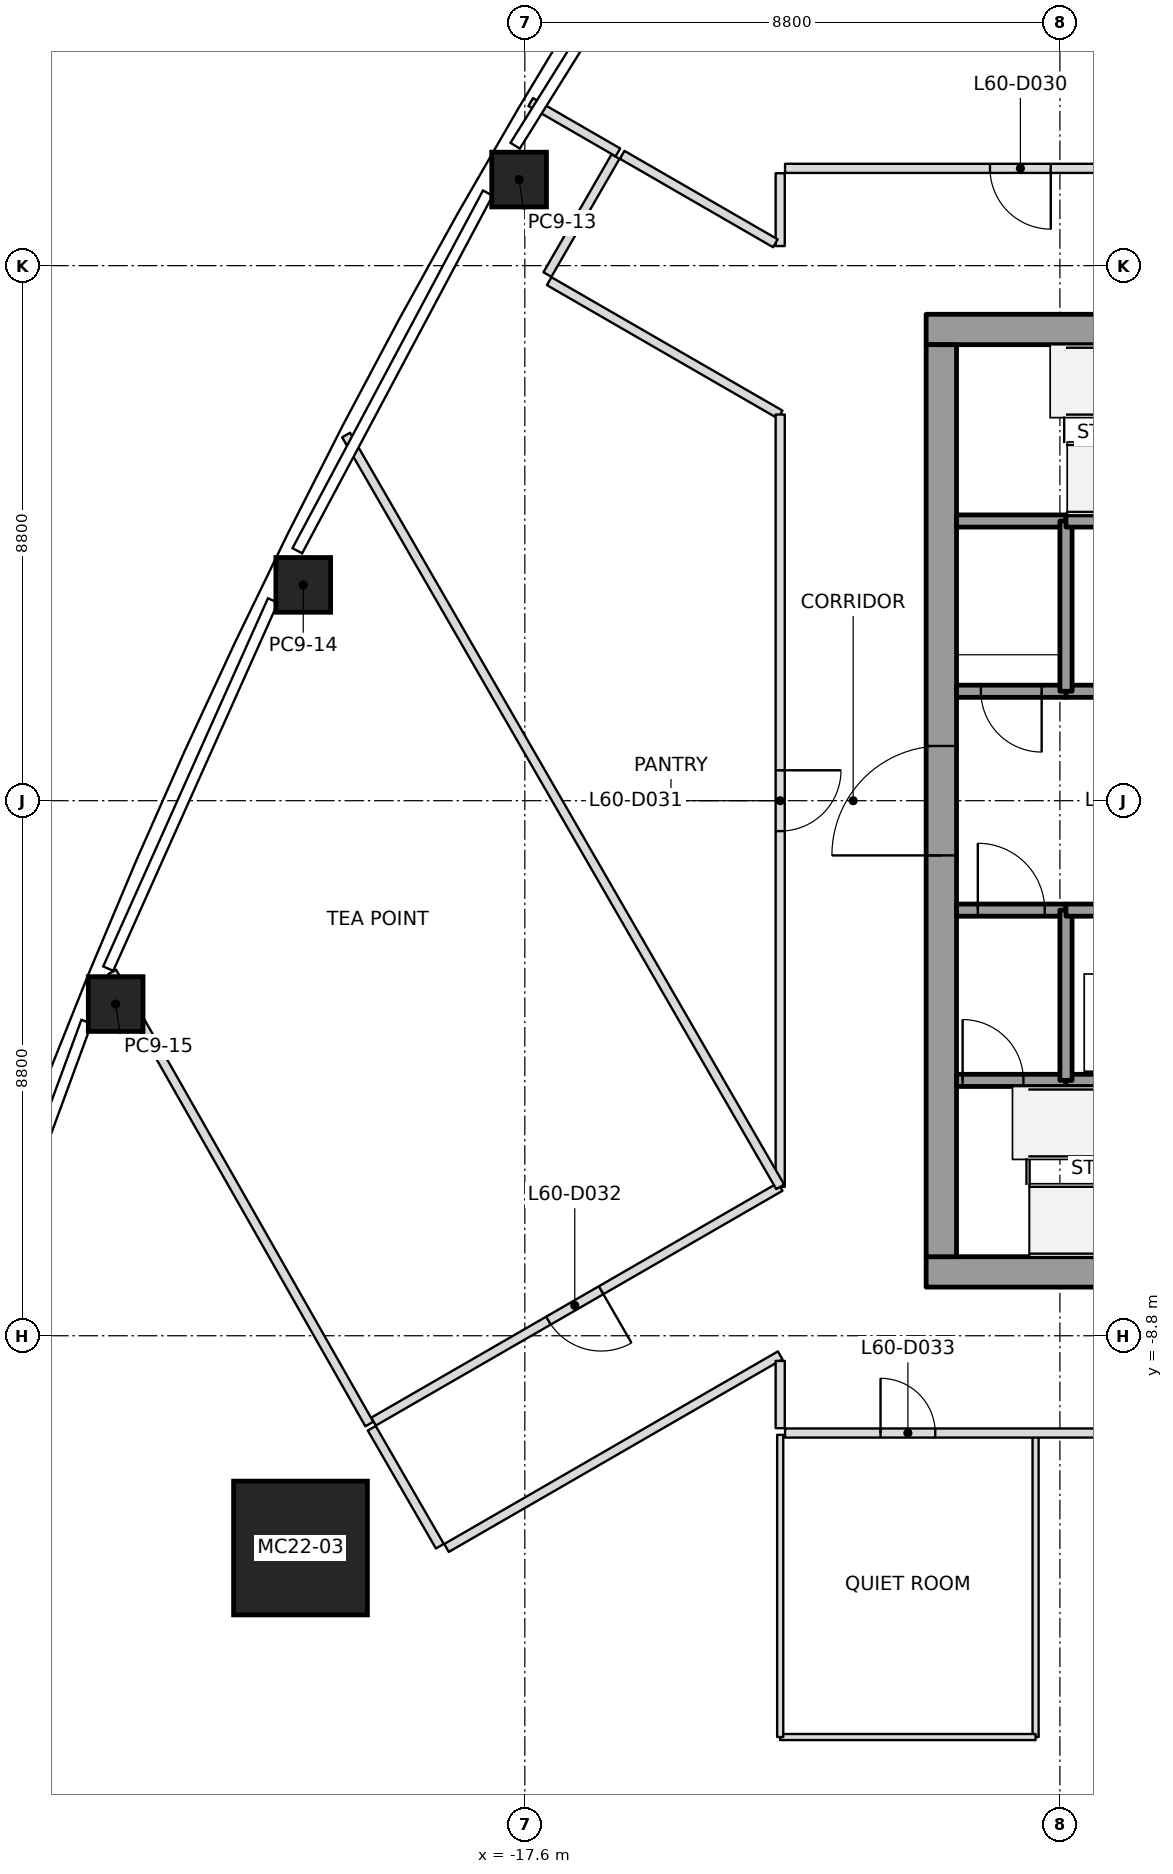
"""IFC4 building model, lengths in metres.
Left out: names, types, materials, properties, quantities, classifications, styles, units other than length and angle.
Written with IfcOpenShell. Run it as: python <this file> out.ifc"""

import sys

from ifc_helpers import new_model, si_unit, direction, frame, frame_2d, origin, origin_2d, place, context, subcontext, project, spatial, rectangle, extrude, element, fill, save


model = new_model("IFC4")
c1 = context("Model", 3, precision=1e-05, world=origin(), true_north=direction((0.0, 1.0)))
c2 = subcontext(c1, "Body", "Model", "MODEL_VIEW")
j1 = project(units=[si_unit("LENGTHUNIT", "METRE"), si_unit("PLANEANGLEUNIT", "RADIAN")], contexts=[c1])
p1 = place(None, origin())
s1 = spatial("IfcSite", under=j1, at=p1, CompositionType="ELEMENT")
p2 = place(p1, origin())
s2 = spatial("IfcBuilding", under=s1, at=p2, CompositionType="ELEMENT")
p3 = place(p2, frame((0.0, 0.0, 267.0)))
s3 = spatial("IfcBuildingStorey", under=s2, at=p3, CompositionType="ELEMENT", Elevation=267.0)
p4 = place(p3, frame((-21.289, -12.291, 0.0), z_axis=(0.027817676907, 0.016043967164, 0.999484250986), x_axis=(0.999613013546, -0.000446478676, -0.027814093645)))
e1 = element("IfcColumn", 1, at=p4, inside=s3, PredefinedType="COLUMN", context=c2, shape_type="SweptSolid", body=[
    extrude(rectangle(XDim=2.2, YDim=2.2, at=origin_2d()), origin(), (0.0, 0.0, 1.0), 4.002),
])
p5 = place(p3, frame((-17.694, 10.216, 0.0), z_axis=(0.009887049298, -0.00573692984, 0.999934664812), x_axis=(0.499975560967, 0.866039512843, 2.5126546e-05)))
e2 = element("IfcColumn", 2, at=p5, inside=s3, PredefinedType="COLUMN", context=c2, shape_type="SweptSolid", body=[
    extrude(rectangle(XDim=0.9, YDim=0.9, at=origin_2d()), origin(), (0.0, 0.0, 1.0), 4.0),
])
p6 = place(p3, frame((-21.244, 3.549, 0.0), z_axis=(0.014097691364, 0.002013955909, 0.999898594398), x_axis=(0.439450311586, 0.8982312302, -0.008005044713)))
e3 = element("IfcColumn", 3, at=p6, inside=s3, PredefinedType="COLUMN", context=c2, shape_type="SweptSolid", body=[
    extrude(rectangle(XDim=0.9, YDim=0.9, at=origin_2d()), origin(), (0.0, 0.0, 1.0), 4.0),
])
p7 = place(p3, frame((-24.329, -3.344, 0.0), z_axis=(0.017757551143, 0.009946669541, 0.999792845115), x_axis=(0.376861693588, 0.926132938269, -0.015907374376)))
e4 = element("IfcColumn", 4, at=p7, inside=s3, PredefinedType="COLUMN", context=c2, shape_type="SweptSolid", body=[
    extrude(rectangle(XDim=0.9, YDim=0.9, at=origin_2d()), origin(), (0.0, 0.0, 1.0), 4.001),
])
p8 = place(p3, frame((-11.0, -7.75, 0.0), z_axis=(0.0, 0.0, 1.0), x_axis=(1.0, 0.0, 0.0)))
e5 = element("IfcWall", 5, at=p8, inside=s3, PredefinedType="SHEAR", context=c2, shape_type="SweptSolid", body=[
    extrude(rectangle(XDim=22.0, YDim=0.5, at=frame_2d((11.0, 0.0))), origin(), (0.0, 0.0, 1.0), 4.0),
])
p9 = place(p8, frame((10.45, 0.0, 0.0)))
e6 = element("IfcOpeningElement", 6, at=p9, cuts=e5, PredefinedType="OPENING", context=c2, shape_type="SweptSolid", body=[
    extrude(rectangle(XDim=1.1, YDim=2.1, at=frame_2d((0.55, 1.05))), frame((0.0, 0.25, 0.0), z_axis=(0.0, -1.0, 0.0), x_axis=(1.0, 0.0, 0.0)), (0.0, 0.0, 1.0), 0.5),
])
p10 = place(p3, frame((-11.0, 7.75, 0.0), z_axis=(0.0, 0.0, 1.0), x_axis=(1.0, 0.0, 0.0)))
e7 = element("IfcWall", 7, at=p10, inside=s3, PredefinedType="SHEAR", context=c2, shape_type="SweptSolid", body=[
    extrude(rectangle(XDim=22.0, YDim=0.5, at=frame_2d((11.0, 0.0))), origin(), (0.0, 0.0, 1.0), 4.0),
])
p11 = place(p10, frame((10.45, 0.0, 0.0)))
e8 = element("IfcOpeningElement", 8, at=p11, cuts=e7, PredefinedType="OPENING", context=c2, shape_type="SweptSolid", body=[
    extrude(rectangle(XDim=1.1, YDim=2.1, at=frame_2d((0.55, 1.05))), frame((0.0, 0.25, 0.0), z_axis=(0.0, -1.0, 0.0), x_axis=(1.0, 0.0, 0.0)), (0.0, 0.0, 1.0), 0.5),
])
p12 = place(p3, frame((-10.75, -7.5, 0.0), z_axis=(0.0, 0.0, 1.0), x_axis=(0.0, 1.0, 0.0)))
e9 = element("IfcWall", 9, at=p12, inside=s3, PredefinedType="SHEAR", context=c2, shape_type="SweptSolid", body=[
    extrude(rectangle(XDim=15.0, YDim=0.5, at=frame_2d((7.5, 0.0))), origin(), (0.0, 0.0, 1.0), 4.0),
])
p13 = place(p12, frame((6.6, 0.0, 0.0)))
e10 = element("IfcOpeningElement", 10, at=p13, cuts=e9, PredefinedType="OPENING", context=c2, shape_type="SweptSolid", body=[
    extrude(rectangle(XDim=1.8, YDim=2.1, at=frame_2d((0.9, 1.05))), frame((0.0, 0.25, 0.0), z_axis=(0.0, -1.0, 0.0), x_axis=(1.0, 0.0, 0.0)), (0.0, 0.0, 1.0), 0.5),
])
p14 = place(p3, frame((-10.5, -4.6, 0.0), z_axis=(0.0, 0.0, 1.0), x_axis=(1.0, 0.0, 0.0)))
e11 = element("IfcWall", 11, at=p14, inside=s3, PredefinedType="SOLIDWALL", context=c2, shape_type="SweptSolid", body=[
    extrude(rectangle(XDim=1.8, YDim=0.2, at=frame_2d((0.9, 0.0))), origin(), (0.0, 0.0, 1.0), 3.85),
])
p15 = place(p14, frame((0.1, 0.0, 0.0)))
e12 = element("IfcOpeningElement", 12, at=p15, cuts=e11, PredefinedType="OPENING", context=c2, shape_type="SweptSolid", body=[
    extrude(rectangle(XDim=1.0, YDim=2.1, at=frame_2d((0.5, 1.05))), frame((0.0, 0.1, 0.0), z_axis=(0.0, -1.0, 0.0), x_axis=(1.0, 0.0, 0.0)), (0.0, 0.0, 1.0), 0.2),
])
p16 = place(p3, frame((-10.5, -1.8, 0.0), z_axis=(0.0, 0.0, 1.0), x_axis=(1.0, 0.0, 0.0)))
e13 = element("IfcWall", 13, at=p16, inside=s3, PredefinedType="SOLIDWALL", context=c2, shape_type="SweptSolid", body=[
    extrude(rectangle(XDim=1.8, YDim=0.2, at=frame_2d((0.9, 0.0))), origin(), (0.0, 0.0, 1.0), 3.85),
])
p17 = place(p16, frame((0.35, 0.0, 0.0)))
e14 = element("IfcOpeningElement", 14, at=p17, cuts=e13, PredefinedType="OPENING", context=c2, shape_type="SweptSolid", body=[
    extrude(rectangle(XDim=1.1, YDim=2.1, at=frame_2d((0.55, 1.05))), frame((0.0, 0.1, 0.0), z_axis=(0.0, -1.0, 0.0), x_axis=(1.0, 0.0, 0.0)), (0.0, 0.0, 1.0), 0.2),
])
p18 = place(p3, frame((-8.7, 1.8, 0.0), z_axis=(0.0, 0.0, 1.0), x_axis=(-1.0, 0.0, 0.0)))
e15 = element("IfcWall", 15, at=p18, inside=s3, PredefinedType="SOLIDWALL", context=c2, shape_type="SweptSolid", body=[
    extrude(rectangle(XDim=1.8, YDim=0.2, at=frame_2d((0.9, 0.0))), origin(), (0.0, 0.0, 1.0), 3.85),
])
p19 = place(p18, frame((0.4, 0.0, 0.0)))
e16 = element("IfcOpeningElement", 16, at=p19, cuts=e15, PredefinedType="OPENING", context=c2, shape_type="SweptSolid", body=[
    extrude(rectangle(XDim=1.0, YDim=2.1, at=frame_2d((0.5, 1.05))), frame((0.0, 0.1, 0.0), z_axis=(0.0, -1.0, 0.0), x_axis=(1.0, 0.0, 0.0)), (0.0, 0.0, 1.0), 0.2),
])
p20 = place(p3, frame((-8.7, 4.6, 0.0), z_axis=(0.0, 0.0, 1.0), x_axis=(-1.0, 0.0, 0.0)))
e17 = element("IfcWall", 17, at=p20, inside=s3, PredefinedType="SOLIDWALL", context=c2, shape_type="SweptSolid", body=[
    extrude(rectangle(XDim=1.8, YDim=0.2, at=frame_2d((0.9, 0.0))), origin(), (0.0, 0.0, 1.0), 3.85),
])
p21 = place(p3, frame((-8.7, -4.6, 0.0), z_axis=(0.0, 0.0, 1.0), x_axis=(1.0, 0.0, 0.0)))
e18 = element("IfcWall", 18, at=p21, inside=s3, PredefinedType="SOLIDWALL", context=c2, shape_type="SweptSolid", body=[
    extrude(rectangle(XDim=2.6, YDim=0.2, at=frame_2d((1.3, 0.0))), origin(), (0.0, 0.0, 1.0), 3.85),
])
p22 = place(p3, frame((-8.7, -4.6, 0.0), z_axis=(0.0, 0.0, 1.0), x_axis=(0.0, 1.0, 0.0)))
e19 = element("IfcWall", 19, at=p22, inside=s3, PredefinedType="SOLIDWALL", context=c2, shape_type="SweptSolid", body=[
    extrude(rectangle(XDim=2.8, YDim=0.2, at=frame_2d((1.4, 0.0))), origin(), (0.0, 0.0, 1.0), 3.85),
])
p23 = place(p3, frame((-8.7, -1.8, 0.0), z_axis=(0.0, 0.0, 1.0), x_axis=(1.0, 0.0, 0.0)))
e20 = element("IfcWall", 20, at=p23, inside=s3, PredefinedType="SOLIDWALL", context=c2, shape_type="SweptSolid", body=[
    extrude(rectangle(XDim=2.6, YDim=0.2, at=frame_2d((1.3, 0.0))), origin(), (0.0, 0.0, 1.0), 3.85),
])
p24 = place(p23, frame((0.75, 0.0, 0.0)))
e21 = element("IfcOpeningElement", 21, at=p24, cuts=e20, PredefinedType="OPENING", context=c2, shape_type="SweptSolid", body=[
    extrude(rectangle(XDim=1.1, YDim=2.1, at=frame_2d((0.55, 1.05))), frame((0.0, 0.1, 0.0), z_axis=(0.0, -1.0, 0.0), x_axis=(1.0, 0.0, 0.0)), (0.0, 0.0, 1.0), 0.2),
])
p25 = place(p3, frame((-8.7, 1.8, 0.0), z_axis=(0.0, 0.0, 1.0), x_axis=(1.0, 0.0, 0.0)))
e22 = element("IfcWall", 22, at=p25, inside=s3, PredefinedType="SOLIDWALL", context=c2, shape_type="SweptSolid", body=[
    extrude(rectangle(XDim=5.2, YDim=0.2, at=frame_2d((2.6, 0.0))), origin(), (0.0, 0.0, 1.0), 3.85),
])
p26 = place(p25, frame((2.15, 0.0, 0.0)))
e23 = element("IfcOpeningElement", 23, at=p26, cuts=e22, PredefinedType="OPENING", context=c2, shape_type="SweptSolid", body=[
    extrude(rectangle(XDim=0.9, YDim=2.1, at=frame_2d((0.45, 1.05))), frame((0.0, 0.1, 0.0), z_axis=(0.0, -1.0, 0.0), x_axis=(1.0, 0.0, 0.0)), (0.0, 0.0, 1.0), 0.2),
])
p27 = place(p3, frame((-8.7, 4.6, 0.0), z_axis=(0.0, 0.0, 1.0), x_axis=(0.0, -1.0, 0.0)))
e24 = element("IfcWall", 24, at=p27, inside=s3, PredefinedType="SOLIDWALL", context=c2, shape_type="SweptSolid", body=[
    extrude(rectangle(XDim=2.8, YDim=0.2, at=frame_2d((1.4, 0.0))), origin(), (0.0, 0.0, 1.0), 3.85),
])
p28 = place(p3, frame((-4.3, 4.6, 0.0), z_axis=(0.0, 0.0, 1.0), x_axis=(-1.0, 0.0, 0.0)))
e25 = element("IfcWall", 25, at=p28, inside=s3, PredefinedType="SOLIDWALL", context=c2, shape_type="SweptSolid", body=[
    extrude(rectangle(XDim=4.4, YDim=0.2, at=frame_2d((2.2, 0.0))), origin(), (0.0, 0.0, 1.0), 3.85),
])
p29 = place(p3, frame((-20.157, -10.252, 0.0), z_axis=(0.0, 0.0, 1.0), x_axis=(-0.494481502231, 0.869188152215, 0.0)))
e26 = element("IfcWall", 26, at=p29, inside=s3, PredefinedType="PARTITIONING", context=c2, shape_type="SweptSolid", body=[
    extrude(rectangle(XDim=8.555, YDim=0.15, at=frame_2d((4.277, 0.0))), origin(), (0.0, 0.0, 1.0), 3.443),
])
p30 = place(p3, frame((-13.4, -6.351, 0.0), z_axis=(0.0, 0.0, 1.0), x_axis=(-0.500017486311, 0.866015307823, 0.0)))
e27 = element("IfcWall", 27, at=p30, inside=s3, PredefinedType="PARTITIONING", context=c2, shape_type="SweptSolid", body=[
    extrude(rectangle(XDim=14.278, YDim=0.15, at=frame_2d((7.139, 0.0))), origin(), (0.0, 0.0, 1.0), 3.234),
])
p31 = place(p3, frame((-16.068, 10.663, 0.0), z_axis=(0.0, 0.0, 1.0), x_axis=(-0.866021116422, 0.500007425856, 0.0)))
e28 = element("IfcWall", 28, at=p31, inside=s3, PredefinedType="PARTITIONING", context=c2, shape_type="SweptSolid", body=[
    extrude(rectangle(XDim=1.656, YDim=0.15, at=frame_2d((0.828, 0.0))), origin(), (0.0, 0.0, 1.0), 3.234),
])
p32 = place(p3, frame((-20.117, -10.321, 0.0), z_axis=(0.0, 0.0, 1.0), x_axis=(0.500030632641, -0.866007717299, 0.0)))
e29 = element("IfcWall", 29, at=p32, inside=s3, PredefinedType="PARTITIONING", context=c2, shape_type="SweptSolid", body=[
    extrude(rectangle(XDim=2.24, YDim=0.15, at=frame_2d((1.12, 0.0))), origin(), (0.0, 0.0, 1.0), 3.233),
])
p33 = place(p3, frame((-13.4, -6.351, 0.0), z_axis=(0.0, 0.0, 1.0), x_axis=(-0.866024490366, -0.500001582084, 0.0)))
e30 = element("IfcWall", 30, at=p33, inside=s3, PredefinedType="PARTITIONING", context=c2, shape_type="SweptSolid", body=[
    extrude(rectangle(XDim=7.723, YDim=0.15, at=frame_2d((3.861, 0.0))), origin(), (0.0, 0.0, 1.0), 3.317),
])
p34 = place(p33, frame((3.401, 0.0, 0.0)))
e31 = element("IfcOpeningElement", 31, at=p34, cuts=e30, PredefinedType="OPENING", context=c2, shape_type="SweptSolid", body=[
    extrude(rectangle(XDim=1.0, YDim=2.1, at=frame_2d((0.5, 1.05))), frame((0.0, 0.075, 0.0), z_axis=(0.0, -1.0, 0.0), x_axis=(1.0, 0.0, 0.0)), (0.0, 0.0, 1.0), 0.15),
])
p35 = place(p3, frame((-18.888, -12.291, 0.0), z_axis=(0.0, 0.0, 1.0), x_axis=(0.866020054385, 0.500009265317, 0.0)))
e32 = element("IfcWall", 32, at=p35, inside=s3, PredefinedType="PARTITIONING", context=c2, shape_type="SweptSolid", body=[
    extrude(rectangle(XDim=6.337, YDim=0.15, at=frame_2d((3.168, 0.0))), origin(), (0.0, 0.0, 1.0), 3.233),
])
p36 = place(p3, frame((-13.4, -9.214, 0.0), z_axis=(0.0, 0.0, 1.0), x_axis=(0.0, -1.0, 0.0)))
e33 = element("IfcWall", 33, at=p36, inside=s3, PredefinedType="PARTITIONING", context=c2, shape_type="SweptSolid", body=[
    extrude(rectangle(XDim=1.106, YDim=0.15, at=frame_2d((0.553, 0.0))), origin(), (0.0, 0.0, 1.0), 3.233),
])
p37 = place(p3, frame((-16.108, 10.594, 0.0), z_axis=(0.0, 0.0, 1.0), x_axis=(-0.500030632641, -0.866007717299, 0.0)))
e34 = element("IfcWall", 34, at=p37, inside=s3, PredefinedType="PARTITIONING", context=c2, shape_type="SweptSolid", body=[
    extrude(rectangle(XDim=2.24, YDim=0.15, at=frame_2d((1.12, 0.0))), origin(), (0.0, 0.0, 1.0), 3.45),
])
p38 = place(p3, frame((-17.199, 8.544, 0.0), z_axis=(0.0, 0.0, 1.0), x_axis=(0.866042871377, -0.499969744021, 0.0)))
e35 = element("IfcWall", 35, at=p38, inside=s3, PredefinedType="PARTITIONING", context=c2, shape_type="SweptSolid", body=[
    extrude(rectangle(XDim=4.387, YDim=0.15, at=frame_2d((2.193, 0.0))), origin(), (0.0, 0.0, 1.0), 3.45),
])
p39 = place(p3, frame((-13.4, 6.351, 0.0), z_axis=(0.0, 0.0, 1.0), x_axis=(0.0, -1.0, 0.0)))
e36 = element("IfcWall", 36, at=p39, inside=s3, PredefinedType="PARTITIONING", context=c2, shape_type="SweptSolid", body=[
    extrude(rectangle(XDim=12.702, YDim=0.15, at=frame_2d((6.351, 0.0))), origin(), (0.0, 0.0, 1.0), 3.317),
])
p40 = place(p39, frame((5.851, 0.0, 0.0)))
e37 = element("IfcOpeningElement", 37, at=p40, cuts=e36, PredefinedType="OPENING", context=c2, shape_type="SweptSolid", body=[
    extrude(rectangle(XDim=1.0, YDim=2.1, at=frame_2d((0.5, 1.05))), frame((0.0, 0.075, 0.0), z_axis=(0.0, -1.0, 0.0), x_axis=(1.0, 0.0, 0.0)), (0.0, 0.0, 1.0), 0.15),
])
p41 = place(p3, frame((-13.4, 10.32, 0.0), z_axis=(0.0, 0.0, 1.0), x_axis=(0.0, -1.0, 0.0)))
e38 = element("IfcWall", 38, at=p41, inside=s3, PredefinedType="PARTITIONING", context=c2, shape_type="SweptSolid", body=[
    extrude(rectangle(XDim=1.198, YDim=0.15, at=frame_2d((0.599, 0.0))), origin(), (0.0, 0.0, 1.0), 3.45),
])
p42 = place(p3, frame((-13.479, 9.168, 0.0), z_axis=(0.0, 0.0, 1.0), x_axis=(-0.866019304365, 0.500010564355, 0.0)))
e39 = element("IfcWall", 39, at=p42, inside=s3, PredefinedType="PARTITIONING", context=c2, shape_type="SweptSolid", body=[
    extrude(rectangle(XDim=2.91, YDim=0.15, at=frame_2d((1.455, 0.0))), origin(), (0.0, 0.0, 1.0), 3.45),
])
p43 = place(p3, frame((-13.32, -10.4, 0.0), z_axis=(0.0, 0.0, 1.0), x_axis=(1.0, 0.0, 0.0)))
e40 = element("IfcWall", 40, at=p43, inside=s3, PredefinedType="PARTITIONING", context=c2, shape_type="SweptSolid", body=[
    extrude(rectangle(XDim=12.12, YDim=0.15, at=frame_2d((6.06, 0.0))), origin(), (0.0, 0.0, 1.0), 3.317),
])
p44 = place(p43, frame((1.57, 0.0, 0.0)))
e41 = element("IfcOpeningElement", 41, at=p44, cuts=e40, PredefinedType="OPENING", context=c2, shape_type="SweptSolid", body=[
    extrude(rectangle(XDim=0.9, YDim=2.1, at=frame_2d((0.45, 1.05))), frame((0.0, 0.075, 0.0), z_axis=(0.0, -1.0, 0.0), x_axis=(1.0, 0.0, 0.0)), (0.0, 0.0, 1.0), 0.15),
])
p45 = place(p43, frame((7.67, 0.0, 0.0)))
e42 = element("IfcOpeningElement", 42, at=p45, cuts=e40, PredefinedType="OPENING", context=c2, shape_type="SweptSolid", body=[
    extrude(rectangle(XDim=1.0, YDim=2.1, at=frame_2d((0.5, 1.05))), frame((0.0, 0.075, 0.0), z_axis=(0.0, -1.0, 0.0), x_axis=(1.0, 0.0, 0.0)), (0.0, 0.0, 1.0), 0.15),
])
p46 = place(p3, frame((-4.48, 10.4, 0.0), z_axis=(0.0, 0.0, 1.0), x_axis=(-1.0, 0.0, 0.0)))
e43 = element("IfcWall", 43, at=p46, inside=s3, PredefinedType="PARTITIONING", context=c2, shape_type="SweptSolid", body=[
    extrude(rectangle(XDim=8.84, YDim=0.15, at=frame_2d((4.42, 0.0))), origin(), (0.0, 0.0, 1.0), 3.443),
])
p47 = place(p46, frame((4.47, 0.0, 0.0)))
e44 = element("IfcOpeningElement", 44, at=p47, cuts=e43, PredefinedType="OPENING", context=c2, shape_type="SweptSolid", body=[
    extrude(rectangle(XDim=1.0, YDim=2.1, at=frame_2d((0.5, 1.05))), frame((0.0, 0.075, 0.0), z_axis=(0.0, -1.0, 0.0), x_axis=(1.0, 0.0, 0.0)), (0.0, 0.0, 1.0), 0.15),
])
p48 = place(p3, frame((-9.2, -10.43, 0.0), z_axis=(0.0, 0.0, 1.0), x_axis=(0.0, -1.0, 0.0)))
e45 = element("IfcWall", 45, at=p48, inside=s3, PredefinedType="PARTITIONING", context=c2, shape_type="SweptSolid", body=[
    extrude(rectangle(XDim=4.97, YDim=0.1, at=frame_2d((2.485, 0.0))), origin(), (0.0, 0.0, 1.0), 3.45),
])
p49 = place(p3, frame((-9.2, -15.4, 0.0), z_axis=(0.0, 0.0, 1.0), x_axis=(-1.0, 0.0, 0.0)))
e46 = element("IfcWall", 46, at=p49, inside=s3, PredefinedType="PARTITIONING", context=c2, shape_type="SweptSolid", body=[
    extrude(rectangle(XDim=4.2, YDim=0.1, at=frame_2d((2.1, 0.0))), origin(), (0.0, 0.0, 1.0), 3.393),
])
p50 = place(p3, frame((-13.4, -15.4, 0.0), z_axis=(0.0, 0.0, 1.0), x_axis=(0.0, 1.0, 0.0)))
e47 = element("IfcWall", 47, at=p50, inside=s3, PredefinedType="PARTITIONING", context=c2, shape_type="SweptSolid", body=[
    extrude(rectangle(XDim=4.97, YDim=0.1, at=frame_2d((2.485, 0.0))), origin(), (0.0, 0.0, 1.0), 3.45),
])
p51 = place(p47, origin())
e48 = element("IfcDoor", 48, at=p51, inside=s3, OperationType="SINGLE_SWING_LEFT", PredefinedType="DOOR", context=c2, shape_type="SweptSolid", body=[
    extrude(rectangle(XDim=1.0, YDim=2.1, at=frame_2d((0.5, 1.05))), frame((0.0, 0.025, 0.0), z_axis=(0.0, -1.0, 0.0), x_axis=(1.0, 0.0, 0.0)), (0.0, 0.0, 1.0), 0.05),
])
fill(e44, e48)
p52 = place(p40, origin())
e49 = element("IfcDoor", 49, at=p52, inside=s3, OperationType="SINGLE_SWING_LEFT", PredefinedType="DOOR", context=c2, shape_type="SweptSolid", body=[
    extrude(rectangle(XDim=1.0, YDim=2.1, at=frame_2d((0.5, 1.05))), frame((0.0, 0.025, 0.0), z_axis=(0.0, -1.0, 0.0), x_axis=(1.0, 0.0, 0.0)), (0.0, 0.0, 1.0), 0.05),
])
fill(e37, e49)
p53 = place(p34, origin())
e50 = element("IfcDoor", 50, at=p53, inside=s3, OperationType="SINGLE_SWING_LEFT", PredefinedType="DOOR", context=c2, shape_type="SweptSolid", body=[
    extrude(rectangle(XDim=1.0, YDim=2.1, at=frame_2d((0.5, 1.05))), frame((0.0, 0.025, 0.0), z_axis=(0.0, -1.0, 0.0), x_axis=(1.0, 0.0, 0.0)), (0.0, 0.0, 1.0), 0.05),
])
fill(e31, e50)
p54 = place(p44, origin())
e51 = element("IfcDoor", 51, at=p54, inside=s3, OperationType="SINGLE_SWING_RIGHT", PredefinedType="DOOR", context=c2, shape_type="SweptSolid", body=[
    extrude(rectangle(XDim=0.9, YDim=2.1, at=frame_2d((0.45, 1.05))), frame((0.0, 0.025, 0.0), z_axis=(0.0, -1.0, 0.0), x_axis=(1.0, 0.0, 0.0)), (0.0, 0.0, 1.0), 0.05),
])
fill(e41, e51)
p55 = place(p17, origin())
e52 = element("IfcDoor", 52, at=p55, inside=s3, OperationType="SINGLE_SWING_RIGHT", PredefinedType="DOOR", context=c2, shape_type="SweptSolid", body=[
    extrude(rectangle(XDim=1.1, YDim=2.1, at=frame_2d((0.55, 1.05))), frame((0.0, 0.025, 0.0), z_axis=(0.0, -1.0, 0.0), x_axis=(1.0, 0.0, 0.0)), (0.0, 0.0, 1.0), 0.05),
])
fill(e14, e52)
p56 = place(p19, origin())
e53 = element("IfcDoor", 53, at=p56, inside=s3, OperationType="SINGLE_SWING_RIGHT", PredefinedType="DOOR", context=c2, shape_type="SweptSolid", body=[
    extrude(rectangle(XDim=1.0, YDim=2.1, at=frame_2d((0.5, 1.05))), frame((0.0, 0.025, 0.0), z_axis=(0.0, -1.0, 0.0), x_axis=(1.0, 0.0, 0.0)), (0.0, 0.0, 1.0), 0.05),
])
fill(e16, e53)
p57 = place(p15, origin())
e54 = element("IfcDoor", 54, at=p57, inside=s3, OperationType="SINGLE_SWING_LEFT", PredefinedType="DOOR", context=c2, shape_type="SweptSolid", body=[
    extrude(rectangle(XDim=1.0, YDim=2.1, at=frame_2d((0.5, 1.05))), frame((0.0, 0.025, 0.0), z_axis=(0.0, -1.0, 0.0), x_axis=(1.0, 0.0, 0.0)), (0.0, 0.0, 1.0), 0.05),
])
fill(e12, e54)
p58 = place(p13, origin())
e55 = element("IfcDoor", 55, at=p58, inside=s3, OperationType="DOUBLE_DOOR_SINGLE_SWING", PredefinedType="DOOR", context=c2, shape_type="SweptSolid", body=[
    extrude(rectangle(XDim=1.8, YDim=2.1, at=frame_2d((0.9, 1.05))), frame((0.0, 0.025, 0.0), z_axis=(0.0, -1.0, 0.0), x_axis=(1.0, 0.0, 0.0)), (0.0, 0.0, 1.0), 0.05),
])
fill(e10, e55)
save(model, sys.argv[1])
